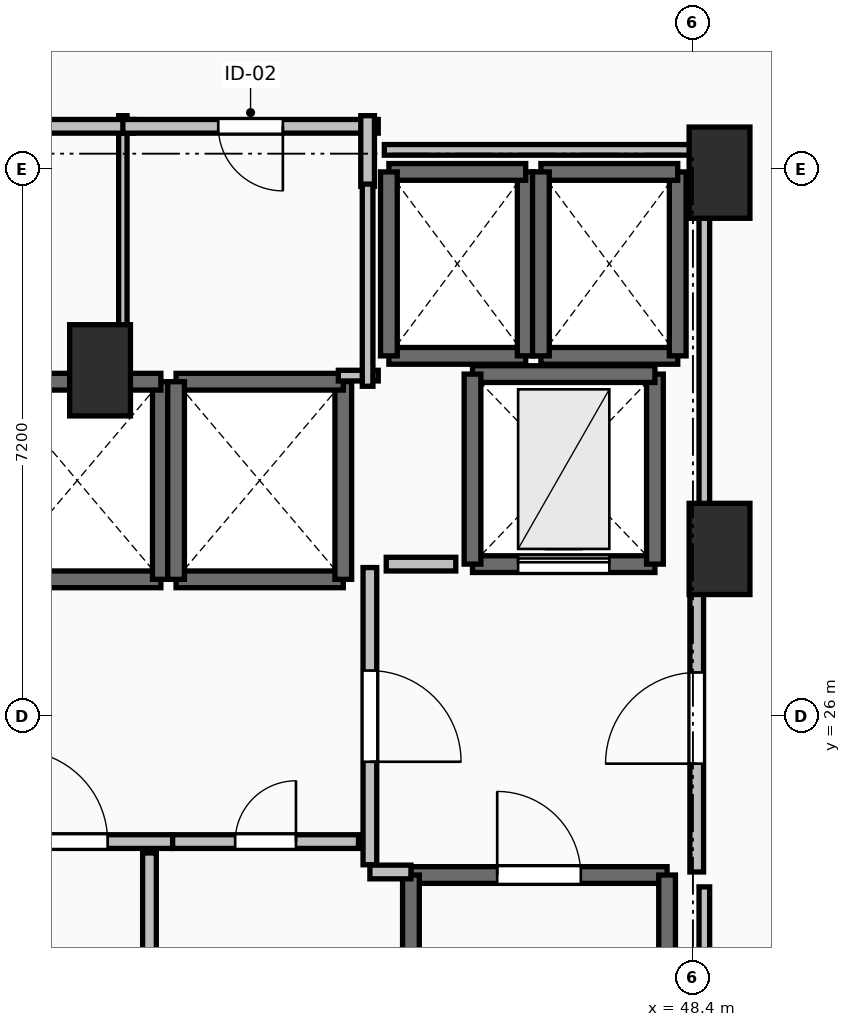
"""IFC4 building model, lengths in metres.
Left out: names, types, materials, properties, quantities, classifications, styles, units other than length and angle.
Written with IfcOpenShell. Run it as: python <this file> out.ifc"""

import sys

from ifc_helpers import new_model, si_unit, direction, frame, frame_2d, origin, origin_2d, place, context, subcontext, project, spatial, rectangle, extrude, element, fill, save


model = new_model("IFC4")
c1 = context("Model", 3, precision=1e-05, world=origin(), true_north=direction((0.0, 1.0)))
c2 = subcontext(c1, "Body", "Model", "MODEL_VIEW")
j1 = project(units=[si_unit("LENGTHUNIT", "METRE"), si_unit("PLANEANGLEUNIT", "RADIAN")], contexts=[c1])
p1 = place(None, origin())
s1 = spatial("IfcSite", under=j1, at=p1, CompositionType="ELEMENT")
p2 = place(p1, origin())
s2 = spatial("IfcBuilding", under=s1, at=p2, CompositionType="ELEMENT")
p3 = place(p2, frame((0.0, 0.0, 143.1)))
s3 = spatial("IfcBuildingStorey", under=s2, at=p3, CompositionType="ELEMENT", Elevation=143.1)
for number, where, z_axis, x_axis in (
    (1, (48.75, 33.15, 0.0), (0.0, 0.0, 1.0), (1.0, 0.0, 0.0)),
    (2, (48.75, 28.2, 0.0), (0.0, 0.0, 1.0), (1.0, 0.0, 0.0)),
    (3, (40.6, 30.55, 0.0), (0.0, 0.0, 1.0), (1.0, 0.0, 0.0)),
):
    element("IfcColumn", number, at=place(p3, frame(where, z_axis=z_axis, x_axis=x_axis)), inside=s3, PredefinedType="PILASTER", context=c2, shape_type="SweptSolid", body=[
        extrude(rectangle(XDim=0.8, YDim=1.2, at=origin_2d()), origin(), (0.0, 0.0, 1.0), 3.5),
    ])
p4 = place(p3, frame((44.69, 23.91, 0.0), z_axis=(0.0, 0.0, 1.0), x_axis=(1.0, 0.0, 0.0)))
e4 = element("IfcWall", 4, at=p4, inside=s3, PredefinedType="SOLIDWALL", context=c2, shape_type="SweptSolid", body=[
    extrude(rectangle(XDim=3.37, YDim=0.22, at=frame_2d((1.685, 0.0))), origin(), (0.0, 0.0, 1.0), 3.24),
])
p5 = place(p4, frame((1.135, 0.0, 0.0)))
e5 = element("IfcOpeningElement", 5, at=p5, cuts=e4, PredefinedType="OPENING", context=c2, shape_type="SweptSolid", body=[
    extrude(rectangle(XDim=1.1, YDim=2.15, at=frame_2d((0.55, 1.075))), frame((0.0, 0.125, 0.0), z_axis=(0.0, -1.0, 0.0), x_axis=(1.0, 0.0, 0.0)), (0.0, 0.0, 1.0), 0.25),
])
for number, where, z_axis, x_axis in (
    (6, (48.06, 23.91, 0.0), (0.0, 0.0, 1.0), (0.0, -1.0, 0.0)),
    (7, (44.69, 16.49, 0.0), (0.0, 0.0, 1.0), (0.0, 1.0, 0.0)),
):
    element("IfcWall", number, at=place(p3, frame(where, z_axis=z_axis, x_axis=x_axis)), inside=s3, PredefinedType="SOLIDWALL", context=c2, shape_type="SweptSolid", body=[
        extrude(rectangle(XDim=7.42, YDim=0.22, at=frame_2d((3.71, 0.0))), origin(), (0.0, 0.0, 1.0), 3.24),
    ])
p6 = place(p3, frame((39.2, 27.8, 0.0), z_axis=(0.0, 0.0, 1.0), x_axis=(1.0, 0.0, 0.0)))
e8 = element("IfcWall", 8, at=p6, inside=s3, PredefinedType="SOLIDWALL", context=c2, shape_type="SweptSolid", body=[
    extrude(rectangle(XDim=2.2, YDim=0.22, at=frame_2d((1.1, 0.0))), origin(), (0.0, 0.0, 1.0), 3.24),
])
p7 = place(p3, frame((41.4, 27.8, 0.0), z_axis=(0.0, 0.0, 1.0), x_axis=(0.0, 1.0, 0.0)))
e9 = element("IfcWall", 9, at=p7, inside=s3, PredefinedType="SOLIDWALL", context=c2, shape_type="SweptSolid", body=[
    extrude(rectangle(XDim=2.6, YDim=0.22, at=frame_2d((1.3, 0.0))), origin(), (0.0, 0.0, 1.0), 3.24),
])
for number, where, z_axis, x_axis in (
    (10, (41.4, 30.4, 0.0), (0.0, 0.0, 1.0), (-1.0, 0.0, 0.0)),
    (11, (41.6, 27.8, 0.0), (0.0, 0.0, 1.0), (1.0, 0.0, 0.0)),
):
    element("IfcWall", number, at=place(p3, frame(where, z_axis=z_axis, x_axis=x_axis)), inside=s3, PredefinedType="SOLIDWALL", context=c2, shape_type="SweptSolid", body=[
        extrude(rectangle(XDim=2.2, YDim=0.22, at=frame_2d((1.1, 0.0))), origin(), (0.0, 0.0, 1.0), 3.24),
    ])
p8 = place(p3, frame((43.8, 27.8, 0.0), z_axis=(0.0, 0.0, 1.0), x_axis=(0.0, 1.0, 0.0)))
e12 = element("IfcWall", 12, at=p8, inside=s3, PredefinedType="SOLIDWALL", context=c2, shape_type="SweptSolid", body=[
    extrude(rectangle(XDim=2.6, YDim=0.22, at=frame_2d((1.3, 0.0))), origin(), (0.0, 0.0, 1.0), 3.24),
])
p9 = place(p3, frame((43.8, 30.4, 0.0), z_axis=(0.0, 0.0, 1.0), x_axis=(-1.0, 0.0, 0.0)))
e13 = element("IfcWall", 13, at=p9, inside=s3, PredefinedType="SOLIDWALL", context=c2, shape_type="SweptSolid", body=[
    extrude(rectangle(XDim=2.2, YDim=0.22, at=frame_2d((1.1, 0.0))), origin(), (0.0, 0.0, 1.0), 3.24),
])
p10 = place(p3, frame((41.6, 30.4, 0.0), z_axis=(0.0, 0.0, 1.0), x_axis=(0.0, -1.0, 0.0)))
e14 = element("IfcWall", 14, at=p10, inside=s3, PredefinedType="SOLIDWALL", context=c2, shape_type="SweptSolid", body=[
    extrude(rectangle(XDim=2.6, YDim=0.22, at=frame_2d((1.3, 0.0))), origin(), (0.0, 0.0, 1.0), 3.24),
])
p11 = place(p3, frame((44.4, 30.74, 0.0), z_axis=(0.0, 0.0, 1.0), x_axis=(1.0, 0.0, 0.0)))
e15 = element("IfcWall", 15, at=p11, inside=s3, PredefinedType="SOLIDWALL", context=c2, shape_type="SweptSolid", body=[
    extrude(rectangle(XDim=1.8, YDim=0.22, at=frame_2d((0.9, 0.0))), origin(), (0.0, 0.0, 1.0), 3.24),
])
p12 = place(p3, frame((46.2, 30.74, 0.0), z_axis=(0.0, 0.0, 1.0), x_axis=(0.0, 1.0, 0.0)))
e16 = element("IfcWall", 16, at=p12, inside=s3, PredefinedType="SOLIDWALL", context=c2, shape_type="SweptSolid", body=[
    extrude(rectangle(XDim=2.42, YDim=0.22, at=frame_2d((1.21, 0.0))), origin(), (0.0, 0.0, 1.0), 3.24),
])
p13 = place(p3, frame((46.2, 33.16, 0.0), z_axis=(0.0, 0.0, 1.0), x_axis=(-1.0, 0.0, 0.0)))
e17 = element("IfcWall", 17, at=p13, inside=s3, PredefinedType="SOLIDWALL", context=c2, shape_type="SweptSolid", body=[
    extrude(rectangle(XDim=1.8, YDim=0.22, at=frame_2d((0.9, 0.0))), origin(), (0.0, 0.0, 1.0), 3.24),
])
p14 = place(p3, frame((44.4, 33.16, 0.0), z_axis=(0.0, 0.0, 1.0), x_axis=(0.0, -1.0, 0.0)))
e18 = element("IfcWall", 18, at=p14, inside=s3, PredefinedType="SOLIDWALL", context=c2, shape_type="SweptSolid", body=[
    extrude(rectangle(XDim=2.42, YDim=0.22, at=frame_2d((1.21, 0.0))), origin(), (0.0, 0.0, 1.0), 3.24),
])
p15 = place(p3, frame((46.4, 30.74, 0.0), z_axis=(0.0, 0.0, 1.0), x_axis=(1.0, 0.0, 0.0)))
e19 = element("IfcWall", 19, at=p15, inside=s3, PredefinedType="SOLIDWALL", context=c2, shape_type="SweptSolid", body=[
    extrude(rectangle(XDim=1.8, YDim=0.22, at=frame_2d((0.9, 0.0))), origin(), (0.0, 0.0, 1.0), 3.24),
])
p16 = place(p3, frame((48.2, 30.74, 0.0), z_axis=(0.0, 0.0, 1.0), x_axis=(0.0, 1.0, 0.0)))
e20 = element("IfcWall", 20, at=p16, inside=s3, PredefinedType="SOLIDWALL", context=c2, shape_type="SweptSolid", body=[
    extrude(rectangle(XDim=2.42, YDim=0.22, at=frame_2d((1.21, 0.0))), origin(), (0.0, 0.0, 1.0), 3.24),
])
p17 = place(p3, frame((48.2, 33.16, 0.0), z_axis=(0.0, 0.0, 1.0), x_axis=(-1.0, 0.0, 0.0)))
e21 = element("IfcWall", 21, at=p17, inside=s3, PredefinedType="SOLIDWALL", context=c2, shape_type="SweptSolid", body=[
    extrude(rectangle(XDim=1.8, YDim=0.22, at=frame_2d((0.9, 0.0))), origin(), (0.0, 0.0, 1.0), 3.24),
])
p18 = place(p3, frame((46.4, 33.16, 0.0), z_axis=(0.0, 0.0, 1.0), x_axis=(0.0, -1.0, 0.0)))
e22 = element("IfcWall", 22, at=p18, inside=s3, PredefinedType="SOLIDWALL", context=c2, shape_type="SweptSolid", body=[
    extrude(rectangle(XDim=2.42, YDim=0.22, at=frame_2d((1.21, 0.0))), origin(), (0.0, 0.0, 1.0), 3.24),
])
p19 = place(p3, frame((45.5, 28.0, 0.0), z_axis=(0.0, 0.0, 1.0), x_axis=(1.0, 0.0, 0.0)))
e23 = element("IfcWall", 23, at=p19, inside=s3, PredefinedType="SHEAR", context=c2, shape_type="SweptSolid", body=[
    extrude(rectangle(XDim=2.4, YDim=0.22, at=frame_2d((1.2, 0.0))), origin(), (0.0, 0.0, 1.0), 3.24),
])
p20 = place(p19, frame((0.6, 0.0, 0.0)))
e24 = element("IfcOpeningElement", 24, at=p20, cuts=e23, PredefinedType="OPENING", context=c2, shape_type="SweptSolid", body=[
    extrude(rectangle(XDim=1.2, YDim=2.2, at=frame_2d((0.6, 1.1))), frame((0.0, 0.125, 0.0), z_axis=(0.0, -1.0, 0.0), x_axis=(1.0, 0.0, 0.0)), (0.0, 0.0, 1.0), 0.25),
])
p21 = place(p3, frame((47.9, 28.0, 0.0), z_axis=(0.0, 0.0, 1.0), x_axis=(0.0, 1.0, 0.0)))
e25 = element("IfcWall", 25, at=p21, inside=s3, PredefinedType="SHEAR", context=c2, shape_type="SweptSolid", body=[
    extrude(rectangle(XDim=2.5, YDim=0.22, at=frame_2d((1.25, 0.0))), origin(), (0.0, 0.0, 1.0), 3.24),
])
p22 = place(p3, frame((47.9, 30.5, 0.0), z_axis=(0.0, 0.0, 1.0), x_axis=(-1.0, 0.0, 0.0)))
e26 = element("IfcWall", 26, at=p22, inside=s3, PredefinedType="SHEAR", context=c2, shape_type="SweptSolid", body=[
    extrude(rectangle(XDim=2.4, YDim=0.22, at=frame_2d((1.2, 0.0))), origin(), (0.0, 0.0, 1.0), 3.24),
])
p23 = place(p3, frame((45.5, 30.5, 0.0), z_axis=(0.0, 0.0, 1.0), x_axis=(0.0, -1.0, 0.0)))
e27 = element("IfcWall", 27, at=p23, inside=s3, PredefinedType="SHEAR", context=c2, shape_type="SweptSolid", body=[
    extrude(rectangle(XDim=2.5, YDim=0.22, at=frame_2d((1.25, 0.0))), origin(), (0.0, 0.0, 1.0), 3.24),
])
p24 = place(p3, frame((44.15, 27.955, 0.0), z_axis=(0.0, 0.0, 1.0), x_axis=(0.0, -1.0, 0.0)))
e28 = element("IfcWall", 28, at=p24, inside=s3, PredefinedType="PARTITIONING", context=c2, shape_type="SweptSolid", body=[
    extrude(rectangle(XDim=3.91, YDim=0.18, at=frame_2d((1.955, 0.0))), origin(), (0.0, 0.0, 1.0), 3.24),
])
p25 = place(p24, frame((1.355, 0.0, 0.0)))
e29 = element("IfcOpeningElement", 29, at=p25, cuts=e28, PredefinedType="OPENING", context=c2, shape_type="SweptSolid", body=[
    extrude(rectangle(XDim=1.2, YDim=2.15, at=frame_2d((0.6, 1.075))), frame((0.0, 0.105, 0.0), z_axis=(0.0, -1.0, 0.0), x_axis=(1.0, 0.0, 0.0)), (0.0, 0.0, 1.0), 0.21),
])
p26 = place(p3, frame((44.15, 23.95, 0.0), z_axis=(0.0, 0.0, 1.0), x_axis=(1.0, 0.0, 0.0)))
e30 = element("IfcWall", 30, at=p26, inside=s3, PredefinedType="PARTITIONING", context=c2, shape_type="SweptSolid", body=[
    extrude(rectangle(XDim=0.54, YDim=0.18, at=frame_2d((0.27, 0.0))), origin(), (0.0, 0.0, 1.0), 3.24),
])
p27 = place(p3, frame((48.45, 23.95, 0.0), z_axis=(0.0, 0.0, 1.0), x_axis=(0.0, 1.0, 0.0)))
e31 = element("IfcWall", 31, at=p27, inside=s3, PredefinedType="PARTITIONING", context=c2, shape_type="SweptSolid", body=[
    extrude(rectangle(XDim=4.05, YDim=0.18, at=frame_2d((2.025, 0.0))), origin(), (0.0, 0.0, 1.0), 3.24),
])
p28 = place(p27, frame((1.425, 0.0, 0.0)))
e32 = element("IfcOpeningElement", 32, at=p28, cuts=e31, PredefinedType="OPENING", context=c2, shape_type="SweptSolid", body=[
    extrude(rectangle(XDim=1.2, YDim=2.15, at=frame_2d((0.6, 1.075))), frame((0.0, 0.105, 0.0), z_axis=(0.0, -1.0, 0.0), x_axis=(1.0, 0.0, 0.0)), (0.0, 0.0, 1.0), 0.21),
])
p29 = place(p3, frame((38.645, 24.35, 0.0), z_axis=(0.0, 0.0, 1.0), x_axis=(1.0, 0.0, 0.0)))
e33 = element("IfcWall", 33, at=p29, inside=s3, PredefinedType="PARTITIONING", context=c2, shape_type="SweptSolid", body=[
    extrude(rectangle(XDim=2.91, YDim=0.18, at=frame_2d((1.455, 0.0))), origin(), (0.0, 0.0, 1.0), 3.24),
])
p30 = place(p29, frame((0.855, 0.0, 0.0)))
e34 = element("IfcOpeningElement", 34, at=p30, cuts=e33, PredefinedType="OPENING", context=c2, shape_type="SweptSolid", body=[
    extrude(rectangle(XDim=1.2, YDim=2.15, at=frame_2d((0.6, 1.075))), frame((0.0, 0.105, 0.0), z_axis=(0.0, -1.0, 0.0), x_axis=(1.0, 0.0, 0.0)), (0.0, 0.0, 1.0), 0.21),
])
p31 = place(p3, frame((41.555, 24.35, 0.0), z_axis=(0.0, 0.0, 1.0), x_axis=(1.0, 0.0, 0.0)))
e35 = element("IfcWall", 35, at=p31, inside=s3, PredefinedType="PARTITIONING", context=c2, shape_type="SweptSolid", body=[
    extrude(rectangle(XDim=2.445, YDim=0.18, at=frame_2d((1.223, 0.0))), origin(), (0.0, 0.0, 1.0), 3.24),
])
p32 = place(p31, frame((0.823, 0.0, 0.0)))
e36 = element("IfcOpeningElement", 36, at=p32, cuts=e35, PredefinedType="OPENING", context=c2, shape_type="SweptSolid", body=[
    extrude(rectangle(XDim=0.8, YDim=2.05, at=frame_2d((0.4, 1.025))), frame((0.0, 0.105, 0.0), z_axis=(0.0, -1.0, 0.0), x_axis=(1.0, 0.0, 0.0)), (0.0, 0.0, 1.0), 0.21),
])
p33 = place(p3, frame((41.25, 16.32, 0.0), z_axis=(0.0, 0.0, 1.0), x_axis=(0.0, 1.0, 0.0)))
e37 = element("IfcWall", 37, at=p33, inside=s3, PredefinedType="PARTITIONING", context=c2, shape_type="SweptSolid", body=[
    extrude(rectangle(XDim=7.88, YDim=0.18, at=frame_2d((3.94, 0.0))), origin(), (0.0, 0.0, 1.0), 3.24),
])
p34 = place(p33, frame((3.54, 0.0, 0.0)))
e38 = element("IfcOpeningElement", 38, at=p34, cuts=e37, PredefinedType="OPENING", context=c2, shape_type="SweptSolid", body=[
    extrude(rectangle(XDim=0.8, YDim=2.05, at=frame_2d((0.4, 1.025))), frame((0.0, 0.105, 0.0), z_axis=(0.0, -1.0, 0.0), x_axis=(1.0, 0.0, 0.0)), (0.0, 0.0, 1.0), 0.21),
])
p35 = place(p3, frame((40.9, 30.34, 0.0), z_axis=(0.0, 0.0, 1.0), x_axis=(0.0, 1.0, 0.0)))
e39 = element("IfcWall", 39, at=p35, inside=s3, PredefinedType="PARTITIONING", context=c2, shape_type="SweptSolid", body=[
    extrude(rectangle(XDim=3.56, YDim=0.11, at=frame_2d((1.78, 0.0))), origin(), (0.0, 0.0, 1.0), 3.24),
])
p36 = place(p3, frame((41.04, 33.76, 0.0), z_axis=(0.0, 0.0, 1.0), x_axis=(-1.0, 0.0, 0.0)))
e40 = element("IfcWall", 40, at=p36, inside=s3, PredefinedType="PARTITIONING", context=c2, shape_type="SweptSolid", body=[
    extrude(rectangle(XDim=4.84, YDim=0.18, at=frame_2d((2.42, 0.0))), origin(), (0.0, 0.0, 1.0), 3.24),
])
p37 = place(p36, frame((1.995, 0.0, 0.0)))
e41 = element("IfcOpeningElement", 41, at=p37, cuts=e40, PredefinedType="OPENING", context=c2, shape_type="SweptSolid", body=[
    extrude(rectangle(XDim=0.85, YDim=2.1, at=frame_2d((0.425, 1.05))), frame((0.0, 0.105, 0.0), z_axis=(0.0, -1.0, 0.0), x_axis=(1.0, 0.0, 0.0)), (0.0, 0.0, 1.0), 0.21),
])
p38 = place(p3, frame((44.26, 33.76, 0.0), z_axis=(0.0, 0.0, 1.0), x_axis=(-1.0, 0.0, 0.0)))
e42 = element("IfcWall", 42, at=p38, inside=s3, PredefinedType="PARTITIONING", context=c2, shape_type="SweptSolid", body=[
    extrude(rectangle(XDim=3.36, YDim=0.18, at=frame_2d((1.68, 0.0))), origin(), (0.0, 0.0, 1.0), 3.24),
])
p39 = place(p38, frame((1.255, 0.0, 0.0)))
e43 = element("IfcOpeningElement", 43, at=p39, cuts=e42, PredefinedType="OPENING", context=c2, shape_type="SweptSolid", body=[
    extrude(rectangle(XDim=0.85, YDim=2.1, at=frame_2d((0.425, 1.05))), frame((0.0, 0.105, 0.0), z_axis=(0.0, -1.0, 0.0), x_axis=(1.0, 0.0, 0.0)), (0.0, 0.0, 1.0), 0.21),
])
p40 = place(p3, frame((44.12, 32.97, 0.0), z_axis=(0.0, 0.0, 1.0), x_axis=(0.0, 1.0, 0.0)))
e44 = element("IfcWall", 44, at=p40, inside=s3, PredefinedType="PARTITIONING", context=c2, shape_type="SweptSolid", body=[
    extrude(rectangle(XDim=0.93, YDim=0.18, at=frame_2d((0.465, 0.0))), origin(), (0.0, 0.0, 1.0), 3.24),
])
p41 = place(p3, frame((45.28, 28.0, 0.0), z_axis=(0.0, 0.0, 1.0), x_axis=(-1.0, 0.0, 0.0)))
e45 = element("IfcWall", 45, at=p41, inside=s3, PredefinedType="PARTITIONING", context=c2, shape_type="SweptSolid", body=[
    extrude(rectangle(XDim=0.915, YDim=0.18, at=frame_2d((0.458, 0.0))), origin(), (0.0, 0.0, 1.0), 3.24),
])
p42 = place(p3, frame((43.735, 30.48, 0.0), z_axis=(0.0, 0.0, 1.0), x_axis=(1.0, 0.0, 0.0)))
e46 = element("IfcWall", 46, at=p42, inside=s3, PredefinedType="PARTITIONING", context=c2, shape_type="SweptSolid", body=[
    extrude(rectangle(XDim=0.525, YDim=0.14, at=frame_2d((0.262, 0.0))), origin(), (0.0, 0.0, 1.0), 3.24),
])
p43 = place(p3, frame((44.12, 30.34, 0.0), z_axis=(0.0, 0.0, 1.0), x_axis=(0.0, 1.0, 0.0)))
e47 = element("IfcWall", 47, at=p43, inside=s3, PredefinedType="PARTITIONING", context=c2, shape_type="SweptSolid", body=[
    extrude(rectangle(XDim=2.66, YDim=0.14, at=frame_2d((1.33, 0.0))), origin(), (0.0, 0.0, 1.0), 3.24),
])
p44 = place(p3, frame((48.55, 16.24, 0.0), z_axis=(0.0, 0.0, 1.0), x_axis=(0.0, 1.0, 0.0)))
e48 = element("IfcWall", 48, at=p44, inside=s3, PredefinedType="PARTITIONING", context=c2, shape_type="SweptSolid", body=[
    extrude(rectangle(XDim=7.514, YDim=0.14, at=frame_2d((3.757, 0.0))), origin(), (0.0, 0.0, 1.0), 2.432),
])
p45 = place(p3, frame((48.55, 28.196, 0.0), z_axis=(0.0, 0.0, 1.0), x_axis=(0.0, 1.0, 0.0)))
e49 = element("IfcWall", 49, at=p45, inside=s3, PredefinedType="PARTITIONING", context=c2, shape_type="SweptSolid", body=[
    extrude(rectangle(XDim=5.254, YDim=0.14, at=frame_2d((2.627, 0.0))), origin(), (0.0, 0.0, 1.0), 2.432),
])
p46 = place(p3, frame((48.55, 33.45, 0.0), z_axis=(0.0, 0.0, 1.0), x_axis=(-1.0, 0.0, 0.0)))
e50 = element("IfcWall", 50, at=p46, inside=s3, PredefinedType="PARTITIONING", context=c2, shape_type="SweptSolid", body=[
    extrude(rectangle(XDim=4.21, YDim=0.14, at=frame_2d((2.105, 0.0))), origin(), (0.0, 0.0, 1.0), 2.432),
])
p47 = place(p5, origin())
e51 = element("IfcDoor", 51, at=p47, inside=s3, OperationType="SINGLE_SWING_LEFT", PredefinedType="DOOR", context=c2, shape_type="SweptSolid", body=[
    extrude(rectangle(XDim=1.1, YDim=2.15, at=frame_2d((0.55, 1.075))), frame((0.0, 0.025, 0.0), z_axis=(0.0, -1.0, 0.0), x_axis=(1.0, 0.0, 0.0)), (0.0, 0.0, 1.0), 0.05),
])
fill(e5, e51)
p48 = place(p20, origin())
e52 = element("IfcDoor", 52, at=p48, inside=s3, OperationType="SLIDING_TO_LEFT", PredefinedType="DOOR", context=c2, shape_type="SweptSolid", body=[
    extrude(rectangle(XDim=1.2, YDim=2.2, at=frame_2d((0.6, 1.1))), frame((0.0, 0.025, 0.0), z_axis=(0.0, -1.0, 0.0), x_axis=(1.0, 0.0, 0.0)), (0.0, 0.0, 1.0), 0.05),
])
fill(e24, e52)
p49 = place(p25, origin())
e53 = element("IfcDoor", 53, at=p49, inside=s3, OperationType="SINGLE_SWING_RIGHT", PredefinedType="DOOR", context=c2, shape_type="SweptSolid", body=[
    extrude(rectangle(XDim=1.2, YDim=2.15, at=frame_2d((0.6, 1.075))), frame((0.0, 0.025, 0.0), z_axis=(0.0, -1.0, 0.0), x_axis=(1.0, 0.0, 0.0)), (0.0, 0.0, 1.0), 0.05),
])
fill(e29, e53)
p50 = place(p28, origin())
e54 = element("IfcDoor", 54, at=p50, inside=s3, OperationType="SINGLE_SWING_LEFT", PredefinedType="DOOR", context=c2, shape_type="SweptSolid", body=[
    extrude(rectangle(XDim=1.2, YDim=2.15, at=frame_2d((0.6, 1.075))), frame((0.0, 0.025, 0.0), z_axis=(0.0, -1.0, 0.0), x_axis=(1.0, 0.0, 0.0)), (0.0, 0.0, 1.0), 0.05),
])
fill(e32, e54)
p51 = place(p30, origin())
e55 = element("IfcDoor", 55, at=p51, inside=s3, OperationType="SINGLE_SWING_LEFT", PredefinedType="DOOR", context=c2, shape_type="SweptSolid", body=[
    extrude(rectangle(XDim=1.2, YDim=2.15, at=frame_2d((0.6, 1.075))), frame((0.0, 0.025, 0.0), z_axis=(0.0, -1.0, 0.0), x_axis=(1.0, 0.0, 0.0)), (0.0, 0.0, 1.0), 0.05),
])
fill(e34, e55)
p52 = place(p32, origin())
e56 = element("IfcDoor", 56, at=p52, inside=s3, OperationType="SINGLE_SWING_RIGHT", PredefinedType="DOOR", context=c2, shape_type="SweptSolid", body=[
    extrude(rectangle(XDim=0.8, YDim=2.05, at=frame_2d((0.4, 1.025))), frame((0.0, 0.025, 0.0), z_axis=(0.0, -1.0, 0.0), x_axis=(1.0, 0.0, 0.0)), (0.0, 0.0, 1.0), 0.05),
])
fill(e36, e56)
p53 = place(p39, origin())
e57 = element("IfcDoor", 57, at=p53, inside=s3, OperationType="SINGLE_SWING_LEFT", PredefinedType="DOOR", context=c2, shape_type="SweptSolid", body=[
    extrude(rectangle(XDim=0.85, YDim=2.1, at=frame_2d((0.425, 1.05))), frame((0.0, 0.025, 0.0), z_axis=(0.0, -1.0, 0.0), x_axis=(1.0, 0.0, 0.0)), (0.0, 0.0, 1.0), 0.05),
])
fill(e43, e57)
save(model, sys.argv[1])
